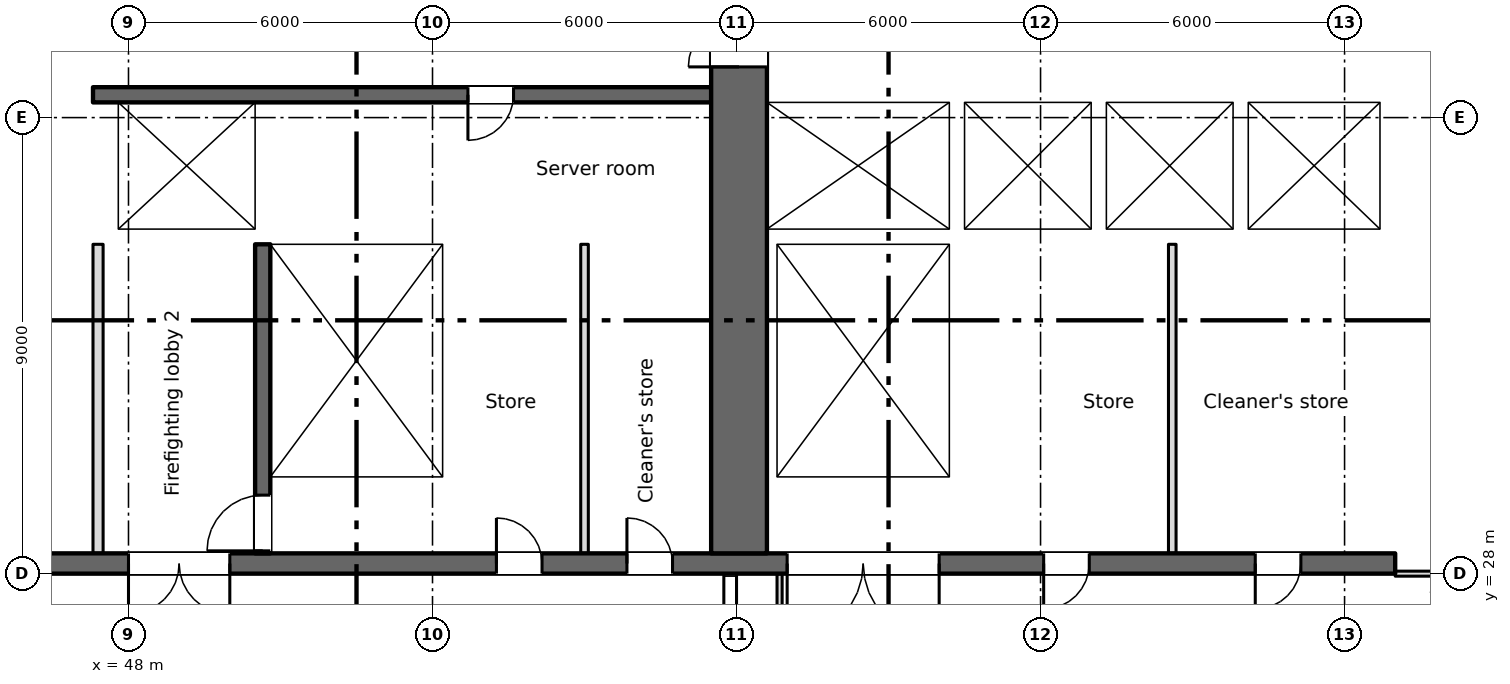
"""IFC4 building model, lengths in metres.
Left out: names, types, materials, properties, quantities, classifications, styles, units other than length and angle.
Written with IfcOpenShell. Run it as: python <this file> out.ifc"""

import sys

from ifc_helpers import new_model, si_unit, direction, frame, frame_2d, origin, place, context, subcontext, project, spatial, rectangle, extrude, element, fill, save


model = new_model("IFC4")
c1 = context("Model", 3, precision=1e-05, world=origin(), true_north=direction((0.0, 1.0)))
c2 = subcontext(c1, "Body", "Model", "MODEL_VIEW")
j1 = project(units=[si_unit("LENGTHUNIT", "METRE"), si_unit("PLANEANGLEUNIT", "RADIAN")], contexts=[c1])
p1 = place(None, origin())
s1 = spatial("IfcSite", under=j1, at=p1, CompositionType="ELEMENT")
p2 = place(p1, origin())
s2 = spatial("IfcBuilding", under=s1, at=p2, CompositionType="ELEMENT")
p3 = place(p2, origin())
s3 = spatial("IfcBuildingStorey", under=s2, at=p3, CompositionType="ELEMENT", Elevation=0.0)
p4 = place(p3, frame((73.0, 28.2, 0.0), z_axis=(0.0, 0.0, 1.0), x_axis=(-1.0, 0.0, 0.0)))
e1 = element("IfcWall", 1, at=p4, inside=s3, PredefinedType="SHEAR", context=c2, shape_type="SweptSolid", body=[
    extrude(rectangle(XDim=66.3, YDim=0.4, at=frame_2d((33.15, 0.0))), origin(), (0.0, 0.0, 1.0), 6.0),
])
p5 = place(p4, frame((51.55, 0.0, 0.0)))
e2 = element("IfcOpeningElement", 2, at=p5, cuts=e1, PredefinedType="OPENING", context=c2, shape_type="SweptSolid", body=[
    extrude(rectangle(XDim=0.9, YDim=2.1, at=frame_2d((0.45, 1.05))), frame((0.0, 0.21, 0.0), z_axis=(0.0, -1.0, 0.0), x_axis=(1.0, 0.0, 0.0)), (0.0, 0.0, 1.0), 0.42),
])
p6 = place(p4, frame((16.837, 0.0, 0.0)))
e3 = element("IfcOpeningElement", 3, at=p6, cuts=e1, PredefinedType="OPENING", context=c2, shape_type="SweptSolid", body=[
    extrude(rectangle(XDim=0.9, YDim=2.1, at=frame_2d((0.45, 1.05))), frame((0.0, 0.21, 0.0), z_axis=(0.0, -1.0, 0.0), x_axis=(1.0, 0.0, 0.0)), (0.0, 0.0, 1.0), 0.42),
])
p7 = place(p4, frame((14.262, 0.0, 0.0)))
e4 = element("IfcOpeningElement", 4, at=p7, cuts=e1, PredefinedType="OPENING", context=c2, shape_type="SweptSolid", body=[
    extrude(rectangle(XDim=0.9, YDim=2.1, at=frame_2d((0.45, 1.05))), frame((0.0, 0.21, 0.0), z_axis=(0.0, -1.0, 0.0), x_axis=(1.0, 0.0, 0.0)), (0.0, 0.0, 1.0), 0.42),
])
p8 = place(p4, frame((64.05, 0.0, 0.0)))
e5 = element("IfcOpeningElement", 5, at=p8, cuts=e1, PredefinedType="OPENING", context=c2, shape_type="SweptSolid", body=[
    extrude(rectangle(XDim=0.9, YDim=2.1, at=frame_2d((0.45, 1.05))), frame((0.0, 0.21, 0.0), z_axis=(0.0, -1.0, 0.0), x_axis=(1.0, 0.0, 0.0)), (0.0, 0.0, 1.0), 0.42),
])
p9 = place(p4, frame((6.038, 0.0, 0.0)))
e6 = element("IfcOpeningElement", 6, at=p9, cuts=e1, PredefinedType="OPENING", context=c2, shape_type="SweptSolid", body=[
    extrude(rectangle(XDim=0.9, YDim=2.1, at=frame_2d((0.45, 1.05))), frame((0.0, 0.21, 0.0), z_axis=(0.0, -1.0, 0.0), x_axis=(1.0, 0.0, 0.0)), (0.0, 0.0, 1.0), 0.42),
])
p10 = place(p4, frame((1.863, 0.0, 0.0)))
e7 = element("IfcOpeningElement", 7, at=p10, cuts=e1, PredefinedType="OPENING", context=c2, shape_type="SweptSolid", body=[
    extrude(rectangle(XDim=0.9, YDim=2.1, at=frame_2d((0.45, 1.05))), frame((0.0, 0.21, 0.0), z_axis=(0.0, -1.0, 0.0), x_axis=(1.0, 0.0, 0.0)), (0.0, 0.0, 1.0), 0.42),
])
p11 = place(p4, frame((59.5, 0.0, 0.0)))
e8 = element("IfcOpeningElement", 8, at=p11, cuts=e1, PredefinedType="OPENING", context=c2, shape_type="SweptSolid", body=[
    extrude(rectangle(XDim=3.0, YDim=2.1, at=frame_2d((1.5, 1.05))), frame((0.0, 0.21, 0.0), z_axis=(0.0, -1.0, 0.0), x_axis=(1.0, 0.0, 0.0)), (0.0, 0.0, 1.0), 0.42),
])
p12 = place(p4, frame((32.5, 0.0, 0.0)))
e9 = element("IfcOpeningElement", 9, at=p12, cuts=e1, PredefinedType="OPENING", context=c2, shape_type="SweptSolid", body=[
    extrude(rectangle(XDim=3.0, YDim=2.1, at=frame_2d((1.5, 1.05))), frame((0.0, 0.21, 0.0), z_axis=(0.0, -1.0, 0.0), x_axis=(1.0, 0.0, 0.0)), (0.0, 0.0, 1.0), 0.42),
])
p13 = place(p4, frame((9.0, 0.0, 0.0)))
e10 = element("IfcOpeningElement", 10, at=p13, cuts=e1, PredefinedType="OPENING", context=c2, shape_type="SweptSolid", body=[
    extrude(rectangle(XDim=3.0, YDim=2.1, at=frame_2d((1.5, 1.05))), frame((0.0, 0.21, 0.0), z_axis=(0.0, -1.0, 0.0), x_axis=(1.0, 0.0, 0.0)), (0.0, 0.0, 1.0), 0.42),
])
p14 = place(p4, frame((43.0, 0.0, 0.0)))
e11 = element("IfcOpeningElement", 11, at=p14, cuts=e1, PredefinedType="OPENING", context=c2, shape_type="SweptSolid", body=[
    extrude(rectangle(XDim=2.0, YDim=2.1, at=frame_2d((1.0, 1.05))), frame((0.0, 0.21, 0.0), z_axis=(0.0, -1.0, 0.0), x_axis=(1.0, 0.0, 0.0)), (0.0, 0.0, 1.0), 0.42),
])
p15 = place(p4, frame((23.0, 0.0, 0.0)))
e12 = element("IfcOpeningElement", 12, at=p15, cuts=e1, PredefinedType="OPENING", context=c2, shape_type="SweptSolid", body=[
    extrude(rectangle(XDim=2.0, YDim=2.1, at=frame_2d((1.0, 1.05))), frame((0.0, 0.21, 0.0), z_axis=(0.0, -1.0, 0.0), x_axis=(1.0, 0.0, 0.0)), (0.0, 0.0, 1.0), 0.42),
])
p16 = place(p4, frame((39.05, 0.0, 0.0)))
e13 = element("IfcOpeningElement", 13, at=p16, cuts=e1, PredefinedType="OPENING", context=c2, shape_type="SweptSolid", body=[
    extrude(rectangle(XDim=2.4, YDim=2.1, at=frame_2d((1.2, 1.05))), frame((0.0, 0.21, 0.0), z_axis=(0.0, -1.0, 0.0), x_axis=(1.0, 0.0, 0.0)), (0.0, 0.0, 1.0), 0.42),
])
p17 = place(p4, frame((26.55, 0.0, 0.0)))
e14 = element("IfcOpeningElement", 14, at=p17, cuts=e1, PredefinedType="OPENING", context=c2, shape_type="SweptSolid", body=[
    extrude(rectangle(XDim=2.4, YDim=2.1, at=frame_2d((1.2, 1.05))), frame((0.0, 0.21, 0.0), z_axis=(0.0, -1.0, 0.0), x_axis=(1.0, 0.0, 0.0)), (0.0, 0.0, 1.0), 0.42),
])
p18 = place(p4, frame((56.1, 0.0, 0.0)))
e15 = element("IfcOpeningElement", 15, at=p18, cuts=e1, PredefinedType="OPENING", context=c2, shape_type="SweptSolid", body=[
    extrude(rectangle(XDim=2.4, YDim=2.1, at=frame_2d((1.2, 1.05))), frame((0.0, 0.21, 0.0), z_axis=(0.0, -1.0, 0.0), x_axis=(1.0, 0.0, 0.0)), (0.0, 0.0, 1.0), 0.42),
])
p19 = place(p4, frame((36.55, 0.0, 0.0)))
e16 = element("IfcOpeningElement", 16, at=p19, cuts=e1, PredefinedType="OPENING", context=c2, shape_type="SweptSolid", body=[
    extrude(rectangle(XDim=0.9, YDim=2.1, at=frame_2d((0.45, 1.05))), frame((0.0, 0.21, 0.0), z_axis=(0.0, -1.0, 0.0), x_axis=(1.0, 0.0, 0.0)), (0.0, 0.0, 1.0), 0.42),
])
p20 = place(p4, frame((30.55, 0.0, 0.0)))
e17 = element("IfcOpeningElement", 17, at=p20, cuts=e1, PredefinedType="OPENING", context=c2, shape_type="SweptSolid", body=[
    extrude(rectangle(XDim=0.9, YDim=2.1, at=frame_2d((0.45, 1.05))), frame((0.0, 0.21, 0.0), z_axis=(0.0, -1.0, 0.0), x_axis=(1.0, 0.0, 0.0)), (0.0, 0.0, 1.0), 0.42),
])
p21 = place(p3, frame((72.85, 28.4, 0.0), z_axis=(0.0, 0.0, 1.0), x_axis=(0.0, 1.0, 0.0)))
e18 = element("IfcWall", 18, at=p21, inside=s3, PredefinedType="SHEAR", context=c2, shape_type="SweptSolid", body=[
    extrude(rectangle(XDim=12.85, YDim=0.3, at=frame_2d((6.425, 0.0))), origin(), (0.0, 0.0, 1.0), 6.0),
])
p22 = place(p3, frame((64.35, 34.8, 0.0), z_axis=(0.0, 0.0, 1.0), x_axis=(0.0, 1.0, 0.0)))
e19 = element("IfcWall", 19, at=p22, inside=s3, PredefinedType="SHEAR", context=c2, shape_type="SweptSolid", body=[
    extrude(rectangle(XDim=2.5, YDim=0.3, at=frame_2d((1.25, 0.0))), origin(), (0.0, 0.0, 1.0), 6.0),
])
p23 = place(p3, frame((60.05, 28.4, 0.0), z_axis=(0.0, 0.0, 1.0), x_axis=(0.0, 1.0, 0.0)))
e20 = element("IfcWall", 20, at=p23, inside=s3, PredefinedType="SHEAR", context=c2, shape_type="SweptSolid", body=[
    extrude(rectangle(XDim=16.5, YDim=1.1, at=frame_2d((8.25, 0.0))), origin(), (0.0, 0.0, 1.0), 6.0),
])
p24 = place(p23, frame((9.6, 0.0, 0.0)))
e21 = element("IfcOpeningElement", 21, at=p24, cuts=e20, PredefinedType="OPENING", context=c2, shape_type="SweptSolid", body=[
    extrude(rectangle(XDim=2.0, YDim=2.1, at=frame_2d((1.0, 1.05))), frame((0.0, 0.56, 0.0), z_axis=(0.0, -1.0, 0.0), x_axis=(1.0, 0.0, 0.0)), (0.0, 0.0, 1.0), 1.12),
])
p25 = place(p23, frame((15.2, 0.0, 0.0)))
e22 = element("IfcOpeningElement", 22, at=p25, cuts=e20, PredefinedType="OPENING", context=c2, shape_type="SweptSolid", body=[
    extrude(rectangle(XDim=1.2, YDim=2.1, at=frame_2d((0.6, 1.05))), frame((0.0, 0.56, 0.0), z_axis=(0.0, -1.0, 0.0), x_axis=(1.0, 0.0, 0.0)), (0.0, 0.0, 1.0), 1.12),
])
p26 = place(p3, frame((50.65, 28.4, 0.0), z_axis=(0.0, 0.0, 1.0), x_axis=(0.0, 1.0, 0.0)))
e23 = element("IfcWall", 23, at=p26, inside=s3, PredefinedType="SHEAR", context=c2, shape_type="SweptSolid", body=[
    extrude(rectangle(XDim=6.1, YDim=0.3, at=frame_2d((3.05, 0.0))), origin(), (0.0, 0.0, 1.0), 6.0),
])
p27 = place(p26, frame((0.05, 0.0, 0.0)))
e24 = element("IfcOpeningElement", 24, at=p27, cuts=e23, PredefinedType="OPENING", context=c2, shape_type="SweptSolid", body=[
    extrude(rectangle(XDim=1.1, YDim=2.1, at=frame_2d((0.55, 1.05))), frame((0.0, 0.16, 0.0), z_axis=(0.0, -1.0, 0.0), x_axis=(1.0, 0.0, 0.0)), (0.0, 0.0, 1.0), 0.32),
])
p28 = place(p3, frame((54.35, 28.4, 0.0), z_axis=(0.0, 0.0, 1.0), x_axis=(0.0, 1.0, 0.0)))
e25 = element("IfcWall", 25, at=p28, inside=s3, PredefinedType="SHEAR", context=c2, shape_type="SweptSolid", body=[
    extrude(rectangle(XDim=6.1, YDim=0.3, at=frame_2d((3.05, 0.0))), origin(), (0.0, 0.0, 1.0), 6.0),
])
p29 = place(p3, frame((60.7, 28.4, 0.0), z_axis=(0.0, 0.0, 1.0), x_axis=(0.0, 1.0, 0.0)))
e26 = element("IfcWall", 26, at=p29, inside=s3, PredefinedType="SHEAR", context=c2, shape_type="SweptSolid", body=[
    extrude(rectangle(XDim=6.1, YDim=0.2, at=frame_2d((3.05, 0.0))), origin(), (0.0, 0.0, 1.0), 6.0),
])
p30 = place(p3, frame((64.35, 28.4, 0.0), z_axis=(0.0, 0.0, 1.0), x_axis=(0.0, 1.0, 0.0)))
e27 = element("IfcWall", 27, at=p30, inside=s3, PredefinedType="SHEAR", context=c2, shape_type="SweptSolid", body=[
    extrude(rectangle(XDim=6.1, YDim=0.3, at=frame_2d((3.05, 0.0))), origin(), (0.0, 0.0, 1.0), 6.0),
])
p31 = place(p3, frame((47.3, 34.65, 0.0), z_axis=(0.0, 0.0, 1.0), x_axis=(1.0, 0.0, 0.0)))
e28 = element("IfcWall", 28, at=p31, inside=s3, PredefinedType="SHEAR", context=c2, shape_type="SweptSolid", body=[
    extrude(rectangle(XDim=12.2, YDim=0.3, at=frame_2d((6.1, 0.0))), origin(), (0.0, 0.0, 1.0), 6.0),
])
p32 = place(p31, frame((1.3, 0.0, 0.0)))
e29 = element("IfcOpeningElement", 29, at=p32, cuts=e28, PredefinedType="OPENING", context=c2, shape_type="SweptSolid", body=[
    extrude(rectangle(XDim=1.1, YDim=2.1, at=frame_2d((0.55, 1.05))), frame((0.0, 0.16, 0.0), z_axis=(0.0, -1.0, 0.0), x_axis=(1.0, 0.0, 0.0)), (0.0, 0.0, 1.0), 0.32),
])
p33 = place(p3, frame((60.6, 34.65, 0.0), z_axis=(0.0, 0.0, 1.0), x_axis=(1.0, 0.0, 0.0)))
e30 = element("IfcWall", 30, at=p33, inside=s3, PredefinedType="SHEAR", context=c2, shape_type="SweptSolid", body=[
    extrude(rectangle(XDim=12.1, YDim=0.3, at=frame_2d((6.05, 0.0))), origin(), (0.0, 0.0, 1.0), 6.0),
])
p34 = place(p3, frame((59.5, 37.45, 0.0), z_axis=(0.0, 0.0, 1.0), x_axis=(-1.0, 0.0, 0.0)))
e31 = element("IfcWall", 31, at=p34, inside=s3, PredefinedType="SHEAR", context=c2, shape_type="SweptSolid", body=[
    extrude(rectangle(XDim=12.2, YDim=0.3, at=frame_2d((6.1, 0.0))), origin(), (0.0, 0.0, 1.0), 6.0),
])
p35 = place(p34, frame((3.9, 0.0, 0.0)))
e32 = element("IfcOpeningElement", 32, at=p35, cuts=e31, PredefinedType="OPENING", context=c2, shape_type="SweptSolid", body=[
    extrude(rectangle(XDim=0.9, YDim=2.1, at=frame_2d((0.45, 1.05))), frame((0.0, 0.16, 0.0), z_axis=(0.0, -1.0, 0.0), x_axis=(1.0, 0.0, 0.0)), (0.0, 0.0, 1.0), 0.32),
])
p36 = place(p3, frame((60.6, 37.45, 0.0), z_axis=(0.0, 0.0, 1.0), x_axis=(1.0, 0.0, 0.0)))
e33 = element("IfcWall", 33, at=p36, inside=s3, PredefinedType="SHEAR", context=c2, shape_type="SweptSolid", body=[
    extrude(rectangle(XDim=12.1, YDim=0.3, at=frame_2d((6.05, 0.0))), origin(), (0.0, 0.0, 1.0), 6.0),
])
p37 = place(p36, frame((1.25, 0.0, 0.0)))
e34 = element("IfcOpeningElement", 34, at=p37, cuts=e33, PredefinedType="OPENING", context=c2, shape_type="SweptSolid", body=[
    extrude(rectangle(XDim=1.1, YDim=2.1, at=frame_2d((0.55, 1.05))), frame((0.0, 0.16, 0.0), z_axis=(0.0, -1.0, 0.0), x_axis=(1.0, 0.0, 0.0)), (0.0, 0.0, 1.0), 0.32),
])
p38 = place(p36, frame((4.6, 0.0, 0.0)))
e35 = element("IfcOpeningElement", 35, at=p38, cuts=e33, PredefinedType="OPENING", context=c2, shape_type="SweptSolid", body=[
    extrude(rectangle(XDim=1.1, YDim=2.1, at=frame_2d((0.55, 1.05))), frame((0.0, 0.16, 0.0), z_axis=(0.0, -1.0, 0.0), x_axis=(1.0, 0.0, 0.0)), (0.0, 0.0, 1.0), 0.32),
])
p39 = place(p36, frame((7.4, 0.0, 0.0)))
e36 = element("IfcOpeningElement", 36, at=p39, cuts=e33, PredefinedType="OPENING", context=c2, shape_type="SweptSolid", body=[
    extrude(rectangle(XDim=1.1, YDim=2.1, at=frame_2d((0.55, 1.05))), frame((0.0, 0.16, 0.0), z_axis=(0.0, -1.0, 0.0), x_axis=(1.0, 0.0, 0.0)), (0.0, 0.0, 1.0), 0.32),
])
p40 = place(p36, frame((10.25, 0.0, 0.0)))
e37 = element("IfcOpeningElement", 37, at=p40, cuts=e33, PredefinedType="OPENING", context=c2, shape_type="SweptSolid", body=[
    extrude(rectangle(XDim=1.1, YDim=2.1, at=frame_2d((0.55, 1.05))), frame((0.0, 0.16, 0.0), z_axis=(0.0, -1.0, 0.0), x_axis=(1.0, 0.0, 0.0)), (0.0, 0.0, 1.0), 0.32),
])
p41 = place(p3, frame((47.55, 34.8, 0.0), z_axis=(0.0, 0.0, 1.0), x_axis=(0.0, 1.0, 0.0)))
e38 = element("IfcWall", 38, at=p41, inside=s3, PredefinedType="SHEAR", context=c2, shape_type="SweptSolid", body=[
    extrude(rectangle(XDim=2.5, YDim=0.5, at=frame_2d((1.25, 0.0))), origin(), (0.0, 0.0, 1.0), 6.0),
])
for number, where, z_axis, x_axis in (
    (39, (50.65, 34.8, 0.0), (0.0, 0.0, 1.0), (0.0, 1.0, 0.0)),
    (40, (67.15, 34.8, 0.0), (0.0, 0.0, 1.0), (0.0, 1.0, 0.0)),
    (41, (69.95, 34.8, 0.0), (0.0, 0.0, 1.0), (0.0, 1.0, 0.0)),
):
    element("IfcWall", number, at=place(p3, frame(where, z_axis=z_axis, x_axis=x_axis)), inside=s3, PredefinedType="SHEAR", context=c2, shape_type="SweptSolid", body=[
        extrude(rectangle(XDim=2.5, YDim=0.3, at=frame_2d((1.25, 0.0))), origin(), (0.0, 0.0, 1.0), 6.0),
    ])
p42 = place(p3, frame((47.4, 28.4, 0.0), z_axis=(0.0, 0.0, 1.0), x_axis=(0.0, 1.0, 0.0)))
e42 = element("IfcWall", 42, at=p42, inside=s3, PredefinedType="PARTITIONING", context=c2, shape_type="SweptSolid", body=[
    extrude(rectangle(XDim=6.1, YDim=0.2, at=frame_2d((3.05, 0.0))), origin(), (0.0, 0.0, 1.0), 6.0),
])
for number, where, z_axis, x_axis in (
    (43, (57.0, 28.4, 0.0), (0.0, 0.0, 1.0), (0.0, 1.0, 0.0)),
    (44, (68.6, 28.4, 0.0), (0.0, 0.0, 1.0), (0.0, 1.0, 0.0)),
):
    element("IfcWall", number, at=place(p3, frame(where, z_axis=z_axis, x_axis=x_axis)), inside=s3, PredefinedType="PARTITIONING", context=c2, shape_type="SweptSolid", body=[
        extrude(rectangle(XDim=6.1, YDim=0.15, at=frame_2d((3.05, 0.0))), origin(), (0.0, 0.0, 1.0), 6.0),
    ])
p43 = place(p3, frame((73.0, 28.0, 0.0), z_axis=(0.0, 0.0, 1.0), x_axis=(1.0, 0.0, 0.0)))
e45 = element("IfcWall", 45, at=p43, inside=s3, PredefinedType="PARTITIONING", context=c2, shape_type="SweptSolid", body=[
    extrude(rectangle(XDim=4.2, YDim=0.1, at=frame_2d((2.1, 0.0))), origin(), (0.0, 0.0, 1.0), 6.0),
])
p44 = place(p43, frame((2.375, 0.0, 0.0)))
e46 = element("IfcOpeningElement", 46, at=p44, cuts=e45, PredefinedType="OPENING", context=c2, shape_type="SweptSolid", body=[
    extrude(rectangle(XDim=1.0, YDim=2.1, at=frame_2d((0.5, 1.05))), frame((0.0, 0.06, 0.0), z_axis=(0.0, -1.0, 0.0), x_axis=(1.0, 0.0, 0.0)), (0.0, 0.0, 1.0), 0.12),
])
p45 = place(p3, frame((60.85, 25.05, 0.0), z_axis=(0.0, 0.0, 1.0), x_axis=(0.0, 1.0, 0.0)))
e47 = element("IfcWall", 47, at=p45, inside=s3, PredefinedType="PARTITIONING", context=c2, shape_type="SweptSolid", body=[
    extrude(rectangle(XDim=2.95, YDim=0.1, at=frame_2d((1.475, 0.0))), origin(), (0.0, 0.0, 1.0), 6.0),
])
p46 = place(p6, origin())
e48 = element("IfcDoor", 48, at=p46, inside=s3, OperationType="SINGLE_SWING_RIGHT", PredefinedType="DOOR", context=c2, shape_type="SweptSolid", body=[
    extrude(rectangle(XDim=0.9, YDim=2.1, at=frame_2d((0.45, 1.05))), frame((0.0, 0.025, 0.0), z_axis=(0.0, -1.0, 0.0), x_axis=(1.0, 0.0, 0.0)), (0.0, 0.0, 1.0), 0.05),
])
fill(e3, e48)
p47 = place(p7, origin())
e49 = element("IfcDoor", 49, at=p47, inside=s3, OperationType="SINGLE_SWING_RIGHT", PredefinedType="DOOR", context=c2, shape_type="SweptSolid", body=[
    extrude(rectangle(XDim=0.9, YDim=2.1, at=frame_2d((0.45, 1.05))), frame((0.0, 0.025, 0.0), z_axis=(0.0, -1.0, 0.0), x_axis=(1.0, 0.0, 0.0)), (0.0, 0.0, 1.0), 0.05),
])
fill(e4, e49)
p48 = place(p9, origin())
e50 = element("IfcDoor", 50, at=p48, inside=s3, OperationType="SINGLE_SWING_RIGHT", PredefinedType="DOOR", context=c2, shape_type="SweptSolid", body=[
    extrude(rectangle(XDim=0.9, YDim=2.1, at=frame_2d((0.45, 1.05))), frame((0.0, 0.025, 0.0), z_axis=(0.0, -1.0, 0.0), x_axis=(1.0, 0.0, 0.0)), (0.0, 0.0, 1.0), 0.05),
])
fill(e6, e50)
p49 = place(p10, origin())
e51 = element("IfcDoor", 51, at=p49, inside=s3, OperationType="SINGLE_SWING_RIGHT", PredefinedType="DOOR", context=c2, shape_type="SweptSolid", body=[
    extrude(rectangle(XDim=0.9, YDim=2.1, at=frame_2d((0.45, 1.05))), frame((0.0, 0.025, 0.0), z_axis=(0.0, -1.0, 0.0), x_axis=(1.0, 0.0, 0.0)), (0.0, 0.0, 1.0), 0.05),
])
fill(e7, e51)
p50 = place(p35, origin())
e52 = element("IfcDoor", 52, at=p50, inside=s3, OperationType="SINGLE_SWING_RIGHT", PredefinedType="DOOR", context=c2, shape_type="SweptSolid", body=[
    extrude(rectangle(XDim=0.9, YDim=2.1, at=frame_2d((0.45, 1.05))), frame((0.0, 0.025, 0.0), z_axis=(0.0, -1.0, 0.0), x_axis=(1.0, 0.0, 0.0)), (0.0, 0.0, 1.0), 0.05),
])
fill(e32, e52)
p51 = place(p37, origin())
e53 = element("IfcDoor", 53, at=p51, inside=s3, OperationType="SLIDING_TO_LEFT", PredefinedType="DOOR", context=c2, shape_type="SweptSolid", body=[
    extrude(rectangle(XDim=1.1, YDim=2.1, at=frame_2d((0.55, 1.05))), frame((0.0, 0.025, 0.0), z_axis=(0.0, -1.0, 0.0), x_axis=(1.0, 0.0, 0.0)), (0.0, 0.0, 1.0), 0.05),
])
fill(e34, e53)
p52 = place(p38, origin())
e54 = element("IfcDoor", 54, at=p52, inside=s3, OperationType="SLIDING_TO_LEFT", PredefinedType="DOOR", context=c2, shape_type="SweptSolid", body=[
    extrude(rectangle(XDim=1.1, YDim=2.1, at=frame_2d((0.55, 1.05))), frame((0.0, 0.025, 0.0), z_axis=(0.0, -1.0, 0.0), x_axis=(1.0, 0.0, 0.0)), (0.0, 0.0, 1.0), 0.05),
])
fill(e35, e54)
p53 = place(p39, origin())
e55 = element("IfcDoor", 55, at=p53, inside=s3, OperationType="SLIDING_TO_LEFT", PredefinedType="DOOR", context=c2, shape_type="SweptSolid", body=[
    extrude(rectangle(XDim=1.1, YDim=2.1, at=frame_2d((0.55, 1.05))), frame((0.0, 0.025, 0.0), z_axis=(0.0, -1.0, 0.0), x_axis=(1.0, 0.0, 0.0)), (0.0, 0.0, 1.0), 0.05),
])
fill(e36, e55)
p54 = place(p40, origin())
e56 = element("IfcDoor", 56, at=p54, inside=s3, OperationType="SLIDING_TO_LEFT", PredefinedType="DOOR", context=c2, shape_type="SweptSolid", body=[
    extrude(rectangle(XDim=1.1, YDim=2.1, at=frame_2d((0.55, 1.05))), frame((0.0, 0.025, 0.0), z_axis=(0.0, -1.0, 0.0), x_axis=(1.0, 0.0, 0.0)), (0.0, 0.0, 1.0), 0.05),
])
fill(e37, e56)
p55 = place(p32, origin())
e57 = element("IfcDoor", 57, at=p55, inside=s3, OperationType="SLIDING_TO_LEFT", PredefinedType="DOOR", context=c2, shape_type="SweptSolid", body=[
    extrude(rectangle(XDim=1.1, YDim=2.1, at=frame_2d((0.55, 1.05))), frame((0.0, 0.025, 0.0), z_axis=(0.0, -1.0, 0.0), x_axis=(1.0, 0.0, 0.0)), (0.0, 0.0, 1.0), 0.05),
])
fill(e29, e57)
p56 = place(p27, origin())
e58 = element("IfcDoor", 58, at=p56, inside=s3, OperationType="SINGLE_SWING_LEFT", PredefinedType="DOOR", context=c2, shape_type="SweptSolid", body=[
    extrude(rectangle(XDim=1.1, YDim=2.1, at=frame_2d((0.55, 1.05))), frame((0.0, 0.025, 0.0), z_axis=(0.0, -1.0, 0.0), x_axis=(1.0, 0.0, 0.0)), (0.0, 0.0, 1.0), 0.05),
])
fill(e24, e58)
p57 = place(p13, origin())
e59 = element("IfcDoor", 59, at=p57, inside=s3, OperationType="DOUBLE_DOOR_SINGLE_SWING", PredefinedType="DOOR", context=c2, shape_type="SweptSolid", body=[
    extrude(rectangle(XDim=3.0, YDim=2.1, at=frame_2d((1.5, 1.05))), frame((0.0, 0.025, 0.0), z_axis=(0.0, -1.0, 0.0), x_axis=(1.0, 0.0, 0.0)), (0.0, 0.0, 1.0), 0.05),
])
fill(e10, e59)
p58 = place(p15, origin())
e60 = element("IfcDoor", 60, at=p58, inside=s3, OperationType="DOUBLE_DOOR_SINGLE_SWING", PredefinedType="DOOR", context=c2, shape_type="SweptSolid", body=[
    extrude(rectangle(XDim=2.0, YDim=2.1, at=frame_2d((1.0, 1.05))), frame((0.0, 0.025, 0.0), z_axis=(0.0, -1.0, 0.0), x_axis=(1.0, 0.0, 0.0)), (0.0, 0.0, 1.0), 0.05),
])
fill(e12, e60)
p59 = place(p24, origin())
e61 = element("IfcDoor", 61, at=p59, inside=s3, OperationType="DOUBLE_DOOR_SINGLE_SWING", PredefinedType="DOOR", context=c2, shape_type="SweptSolid", body=[
    extrude(rectangle(XDim=2.0, YDim=2.1, at=frame_2d((1.0, 1.05))), frame((0.0, 0.025, 0.0), z_axis=(0.0, -1.0, 0.0), x_axis=(1.0, 0.0, 0.0)), (0.0, 0.0, 1.0), 0.05),
])
fill(e21, e61)
save(model, sys.argv[1])
